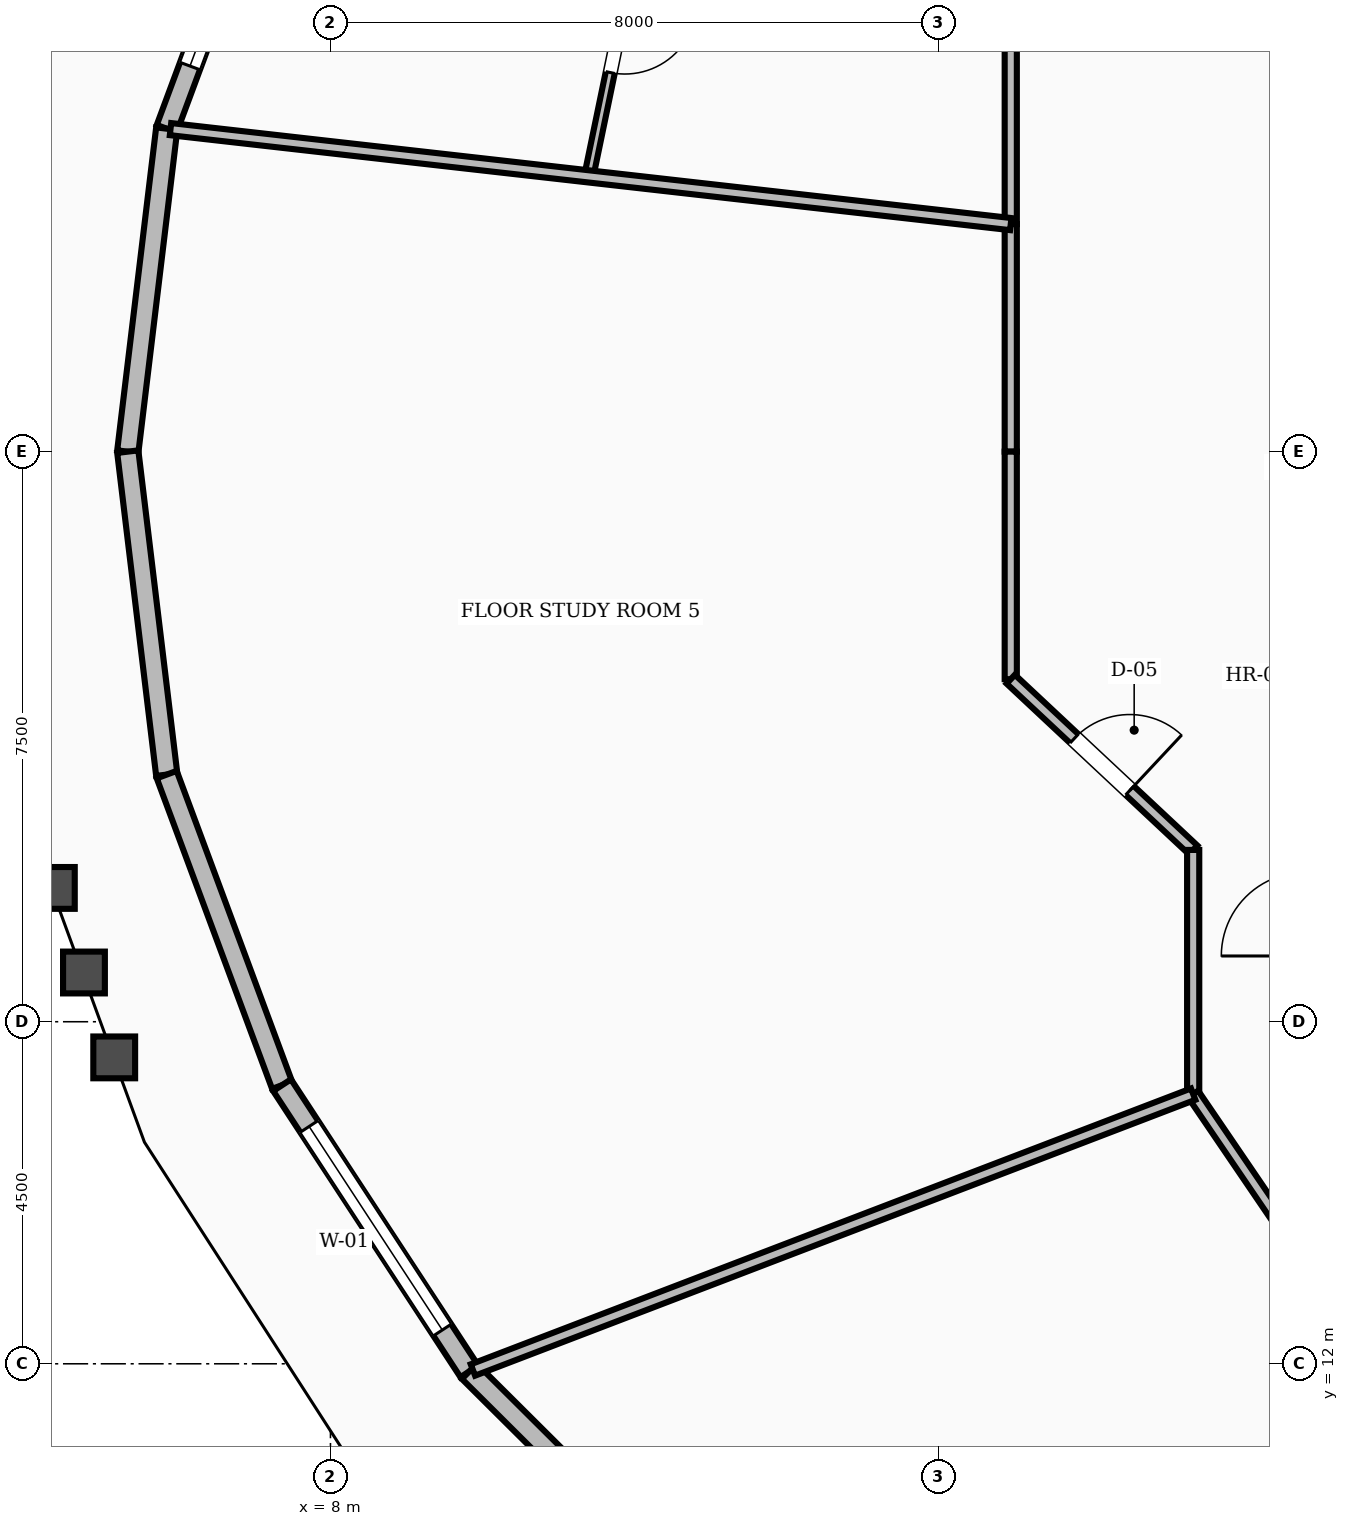
"""IFC4 building model, lengths in metres.
Left out: names, types, materials, properties, quantities, classifications, styles, units other than length and angle.
Written with IfcOpenShell. Run it as: python <this file> out.ifc"""

import sys

from ifc_helpers import new_model, si_unit, direction, frame, frame_2d, origin, place, context, subcontext, project, spatial, rectangle, extrude, element, fill, save


model = new_model("IFC4")
c1 = context("Model", 3, precision=1e-05, world=origin(), true_north=direction((0.0, 1.0)))
c2 = subcontext(c1, "Body", "Model", "MODEL_VIEW")
j1 = project(units=[si_unit("LENGTHUNIT", "METRE"), si_unit("PLANEANGLEUNIT", "RADIAN")], contexts=[c1])
p1 = place(None, origin())
s1 = spatial("IfcSite", under=j1, at=p1, CompositionType="ELEMENT")
p2 = place(p1, origin())
s2 = spatial("IfcBuilding", under=s1, at=p2, CompositionType="ELEMENT")
p3 = place(p2, frame((0.0, 0.0, 124.4)))
s3 = spatial("IfcBuildingStorey", under=s2, at=p3, CompositionType="ELEMENT", Elevation=124.4)
p4 = place(p3, frame((7.363, 32.334, 0.0), z_axis=(0.0, 0.0, 1.0), x_axis=(-0.348211846364, -0.937415868253, 0.0)))
e1 = element("IfcWall", 1, at=p4, inside=s3, PredefinedType="STANDARD", context=c2, shape_type="SweptSolid", body=[
    extrude(rectangle(XDim=4.358, YDim=0.28, at=frame_2d((2.179, 0.0))), origin(), (0.0, 0.0, 1.0), 2.82),
])
p5 = place(p4, frame((0.879, 0.0, 0.8)))
e2 = element("IfcOpeningElement", 2, at=p5, cuts=e1, PredefinedType="OPENING", context=c2, shape_type="SweptSolid", body=[
    extrude(rectangle(XDim=2.6, YDim=1.65, at=frame_2d((1.3, 0.825))), frame((0.0, 0.15, 0.0), z_axis=(0.0, -1.0, 0.0), x_axis=(1.0, 0.0, 0.0)), (0.0, 0.0, 1.0), 0.3),
])
for number, where, z_axis, x_axis in (
    (3, (5.846, 28.249, 0.0), (0.0, 0.0, 1.0), (-0.12, -0.993, 0.0)),
    (4, (5.333, 24.0, 0.0), (0.0, 0.0, 1.0), (0.12, -0.993, 0.0)),
):
    element("IfcWall", number, at=place(p3, frame(where, z_axis=z_axis, x_axis=x_axis)), inside=s3, PredefinedType="STANDARD", context=c2, shape_type="SweptSolid", body=[
        extrude(rectangle(XDim=4.28, YDim=0.28, at=frame_2d((2.14, 0.0))), origin(), (0.0, 0.0, 1.0), 2.82),
    ])
p6 = place(p3, frame((5.846, 19.751, 0.0), z_axis=(0.0, 0.0, 1.0), x_axis=(0.348211846364, -0.937415868253, 0.0)))
e5 = element("IfcWall", 5, at=p6, inside=s3, PredefinedType="STANDARD", context=c2, shape_type="SweptSolid", body=[
    extrude(rectangle(XDim=4.358, YDim=0.28, at=frame_2d((2.179, 0.0))), origin(), (0.0, 0.0, 1.0), 2.82),
])
p7 = place(p3, frame((7.363, 15.666, 0.0), z_axis=(0.0, 0.0, 1.0), x_axis=(0.547581138096, -0.836752590197, 0.0)))
e6 = element("IfcWall", 6, at=p7, inside=s3, PredefinedType="STANDARD", context=c2, shape_type="SweptSolid", body=[
    extrude(rectangle(XDim=4.5, YDim=0.28, at=frame_2d((2.25, 0.0))), origin(), (0.0, 0.0, 1.0), 2.82),
])
p8 = place(p7, frame((0.65, 0.0, 0.8)))
e7 = element("IfcOpeningElement", 7, at=p8, cuts=e6, PredefinedType="OPENING", context=c2, shape_type="SweptSolid", body=[
    extrude(rectangle(XDim=3.2, YDim=1.65, at=frame_2d((1.6, 0.825))), frame((0.0, 0.15, 0.0), z_axis=(0.0, -1.0, 0.0), x_axis=(1.0, 0.0, 0.0)), (0.0, 0.0, 1.0), 0.3),
])
p9 = place(p3, frame((9.827, 11.9, 0.0), z_axis=(0.0, 0.0, 1.0), x_axis=(0.708826657364, -0.70538271159, 0.0)))
e8 = element("IfcWall", 8, at=p9, inside=s3, PredefinedType="STANDARD", context=c2, shape_type="SweptSolid", body=[
    extrude(rectangle(XDim=4.679, YDim=0.28, at=frame_2d((2.339, 0.0))), origin(), (0.0, 0.0, 1.0), 2.82),
])
p10 = place(p3, frame((16.95, 30.234, 0.0), z_axis=(0.0, 0.0, 1.0), x_axis=(0.0, -1.0, 0.0)))
e9 = element("IfcWall", 9, at=p10, inside=s3, PredefinedType="SOLIDWALL", context=c2, shape_type="SweptSolid", body=[
    extrude(rectangle(XDim=3.24, YDim=0.16, at=frame_2d((1.62, 0.0))), origin(), (0.0, 0.0, 1.0), 2.8),
])
for number, where, z_axis, x_axis in (
    (10, (16.95, 26.994, 0.0), (0.0, 0.0, 1.0), (0.0, -1.0, 0.0)),
    (11, (16.95, 24.0, 0.0), (0.0, 0.0, 1.0), (0.0, -1.0, 0.0)),
):
    element("IfcWall", number, at=place(p3, frame(where, z_axis=z_axis, x_axis=x_axis)), inside=s3, PredefinedType="SOLIDWALL", context=c2, shape_type="SweptSolid", body=[
        extrude(rectangle(XDim=2.994, YDim=0.16, at=frame_2d((1.497, 0.0))), origin(), (0.0, 0.0, 1.0), 2.8),
    ])
p11 = place(p3, frame((16.95, 21.006, 0.0), z_axis=(0.0, 0.0, 1.0), x_axis=(0.730150682073, -0.683286163674, 0.0)))
e12 = element("IfcWall", 12, at=p11, inside=s3, PredefinedType="SOLIDWALL", context=c2, shape_type="SweptSolid", body=[
    extrude(rectangle(XDim=3.287, YDim=0.16, at=frame_2d((1.644, 0.0))), origin(), (0.0, 0.0, 1.0), 2.8),
])
p12 = place(p11, frame((1.144, 0.0, 0.0)))
e13 = element("IfcOpeningElement", 13, at=p12, cuts=e12, PredefinedType="OPENING", context=c2, shape_type="SweptSolid", body=[
    extrude(rectangle(XDim=1.0, YDim=2.1, at=frame_2d((0.5, 1.05))), frame((0.0, 0.09, 0.0), z_axis=(0.0, -1.0, 0.0), x_axis=(1.0, 0.0, 0.0)), (0.0, 0.0, 1.0), 0.18),
])
p13 = place(p3, frame((19.35, 18.76, 0.0), z_axis=(0.0, 0.0, 1.0), x_axis=(0.0, -1.0, 0.0)))
e14 = element("IfcWall", 14, at=p13, inside=s3, PredefinedType="SOLIDWALL", context=c2, shape_type="SweptSolid", body=[
    extrude(rectangle(XDim=3.213, YDim=0.16, at=frame_2d((1.606, 0.0))), origin(), (0.0, 0.0, 1.0), 2.8),
])
p14 = place(p3, frame((19.35, 15.548, 0.0), z_axis=(0.0, 0.0, 1.0), x_axis=(0.562674669208, -0.826678423955, 0.0)))
e15 = element("IfcWall", 15, at=p14, inside=s3, PredefinedType="SOLIDWALL", context=c2, shape_type="SweptSolid", body=[
    extrude(rectangle(XDim=3.021, YDim=0.16, at=frame_2d((1.511, 0.0))), origin(), (0.0, 0.0, 1.0), 2.8),
])
p15 = place(p3, frame((12.156, 31.284, 0.0), z_axis=(0.0, 0.0, 1.0), x_axis=(-0.202776091782, -0.979225130704, 0.0)))
e16 = element("IfcWall", 16, at=p15, inside=s3, PredefinedType="PARTITIONING", context=c2, shape_type="SweptSolid", body=[
    extrude(rectangle(XDim=3.741, YDim=0.12, at=frame_2d((1.87, 0.0))), origin(), (0.0, 0.0, 1.0), 2.8),
])
p16 = place(p15, frame((1.395, 0.0, 0.0)))
e17 = element("IfcOpeningElement", 17, at=p16, cuts=e16, PredefinedType="OPENING", context=c2, shape_type="SweptSolid", body=[
    extrude(rectangle(XDim=0.95, YDim=2.1, at=frame_2d((0.475, 1.05))), frame((0.0, 0.07, 0.0), z_axis=(0.0, -1.0, 0.0), x_axis=(1.0, 0.0, 0.0)), (0.0, 0.0, 1.0), 0.14),
])
p17 = place(p3, frame((16.95, 26.994, 0.0), z_axis=(0.0, 0.0, 1.0), x_axis=(-0.993672392065, 0.112317306093, 0.0)))
e18 = element("IfcWall", 18, at=p17, inside=s3, PredefinedType="SOLIDWALL", context=c2, shape_type="SweptSolid", body=[
    extrude(rectangle(XDim=11.125, YDim=0.16, at=frame_2d((5.562, 0.0))), origin(), (0.0, 0.0, 1.0), 2.8),
])
p18 = place(p3, frame((19.35, 15.548, 0.0), z_axis=(0.0, 0.0, 1.0), x_axis=(-0.933853161124, -0.35765664185, 0.0)))
e19 = element("IfcWall", 19, at=p18, inside=s3, PredefinedType="SOLIDWALL", context=c2, shape_type="SweptSolid", body=[
    extrude(rectangle(XDim=10.147, YDim=0.16, at=frame_2d((5.073, 0.0))), origin(), (0.0, 0.0, 1.0), 2.8),
])
p19 = place(p5, origin())
e20 = element("IfcWindow", 20, at=p19, inside=s3, PartitioningType="SINGLE_PANEL", PredefinedType="WINDOW", context=c2, shape_type="SweptSolid", body=[
    extrude(rectangle(XDim=2.6, YDim=1.65, at=frame_2d((1.3, 0.825))), frame((0.0, 0.03, 0.0), z_axis=(0.0, -1.0, 0.0), x_axis=(1.0, 0.0, 0.0)), (0.0, 0.0, 1.0), 0.06),
])
fill(e2, e20)
p20 = place(p8, origin())
e21 = element("IfcWindow", 21, at=p20, inside=s3, PartitioningType="SINGLE_PANEL", PredefinedType="WINDOW", context=c2, shape_type="SweptSolid", body=[
    extrude(rectangle(XDim=3.2, YDim=1.65, at=frame_2d((1.6, 0.825))), frame((0.0, 0.03, 0.0), z_axis=(0.0, -1.0, 0.0), x_axis=(1.0, 0.0, 0.0)), (0.0, 0.0, 1.0), 0.06),
])
fill(e7, e21)
p21 = place(p16, origin())
e22 = element("IfcDoor", 22, at=p21, inside=s3, OperationType="SINGLE_SWING_LEFT", PredefinedType="DOOR", context=c2, shape_type="SweptSolid", body=[
    extrude(rectangle(XDim=0.95, YDim=2.1, at=frame_2d((0.475, 1.05))), frame((0.0, 0.025, 0.0), z_axis=(0.0, -1.0, 0.0), x_axis=(1.0, 0.0, 0.0)), (0.0, 0.0, 1.0), 0.05),
])
fill(e17, e22)
p22 = place(p12, origin())
e23 = element("IfcDoor", 23, at=p22, inside=s3, OperationType="SINGLE_SWING_RIGHT", PredefinedType="DOOR", context=c2, shape_type="SweptSolid", body=[
    extrude(rectangle(XDim=1.0, YDim=2.1, at=frame_2d((0.5, 1.05))), frame((0.0, 0.025, 0.0), z_axis=(0.0, -1.0, 0.0), x_axis=(1.0, 0.0, 0.0)), (0.0, 0.0, 1.0), 0.05),
])
fill(e13, e23)
save(model, sys.argv[1])
